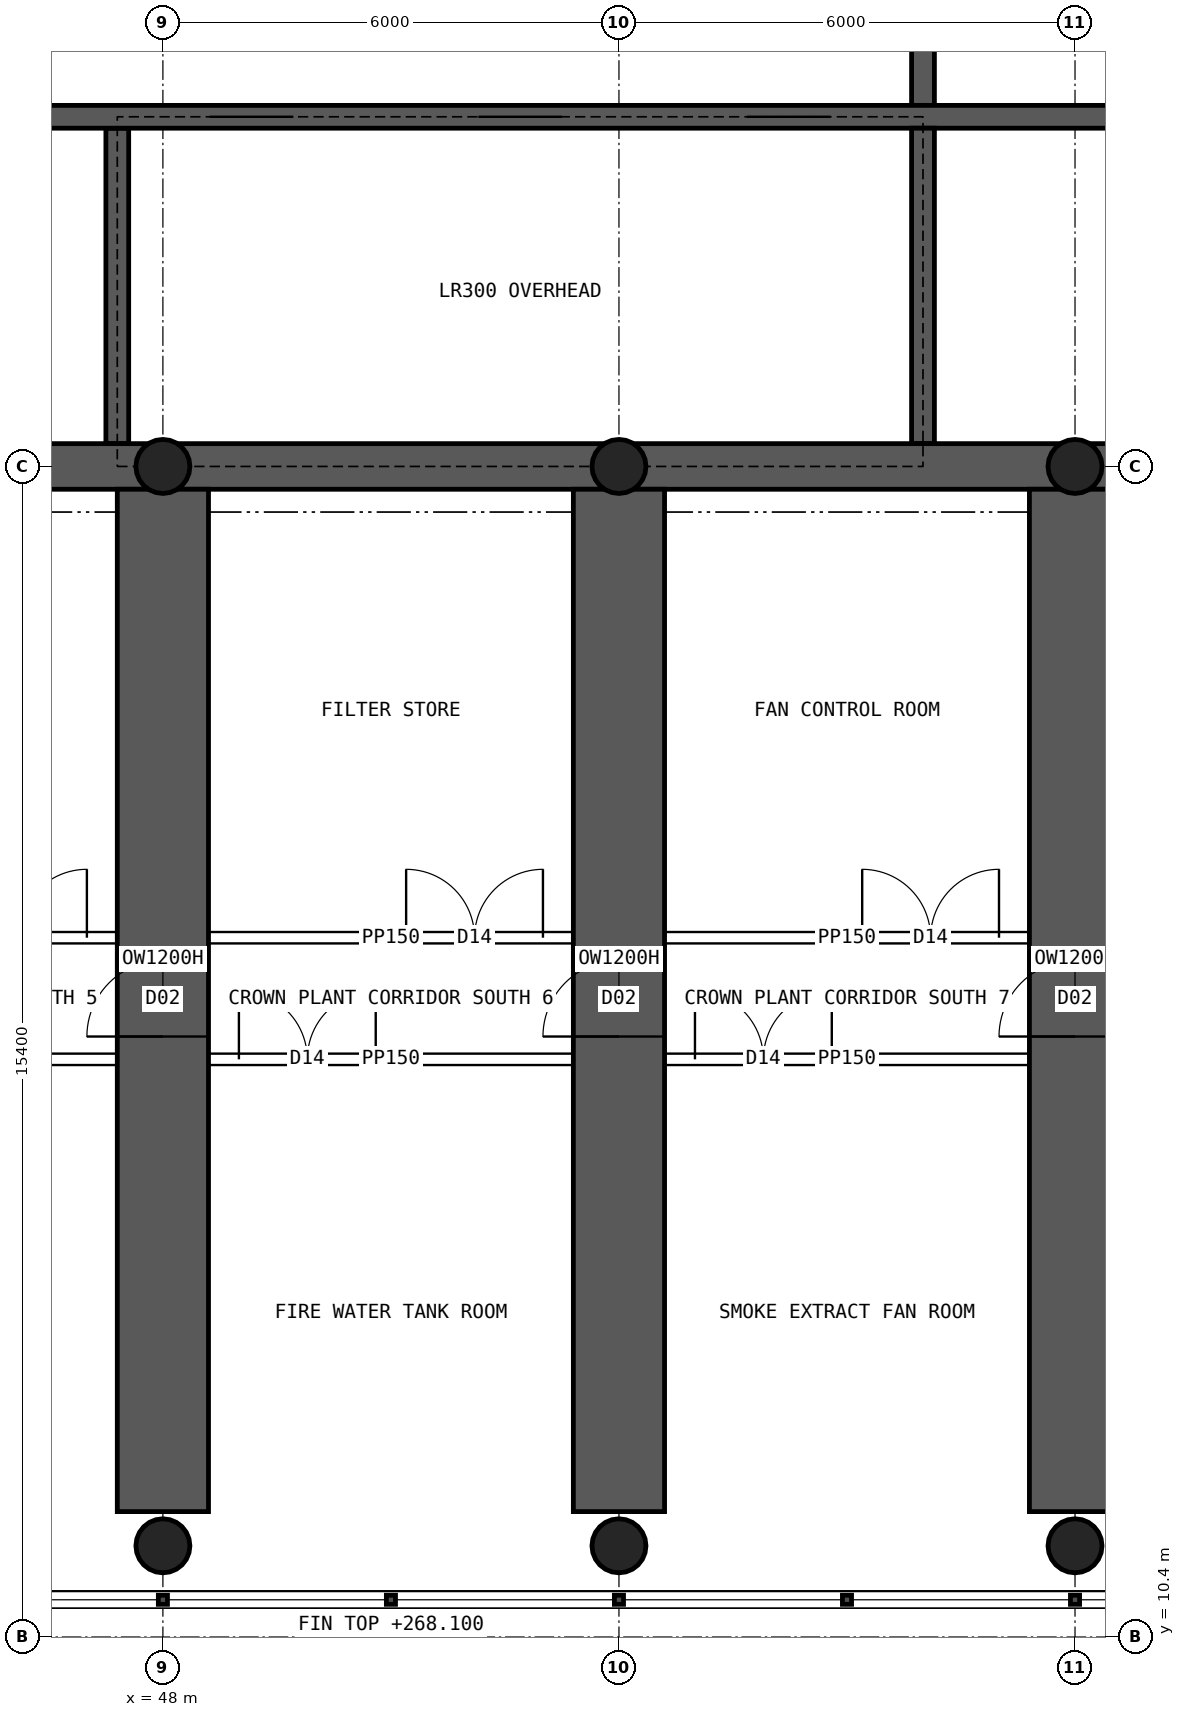
"""IFC4 building model, lengths in metres.
Left out: names, types, materials, properties, quantities, classifications, styles, units other than length and angle.
Written with IfcOpenShell. Run it as: python <this file> out.ifc"""

import sys

from ifc_helpers import new_model, si_unit, direction, frame, frame_2d, origin, origin_2d, place, context, subcontext, project, spatial, rectangle, hollow_circle, extrude, element, fill, save


model = new_model("IFC4")
c1 = context("Model", 3, precision=1e-05, world=origin(), true_north=direction((0.0, 1.0)))
c2 = subcontext(c1, "Body", "Model", "MODEL_VIEW")
j1 = project(units=[si_unit("LENGTHUNIT", "METRE"), si_unit("PLANEANGLEUNIT", "RADIAN")], contexts=[c1])
p1 = place(None, origin())
s1 = spatial("IfcSite", under=j1, at=p1, CompositionType="ELEMENT")
p2 = place(p1, origin())
s2 = spatial("IfcBuilding", under=s1, at=p2, CompositionType="ELEMENT")
p3 = place(p2, frame((0.0, 0.0, 262.3)))
s3 = spatial("IfcBuildingStorey", under=s2, at=p3, CompositionType="ELEMENT", Elevation=262.3)
p4 = place(p3, frame((18.0, 25.8, 0.0), z_axis=(0.0, 0.0, 1.0), x_axis=(1.0, 0.0, 0.0)))
e1 = element("IfcWall", 1, at=p4, inside=s3, PredefinedType="SHEAR", context=c2, shape_type="SweptSolid", body=[
    extrude(rectangle(XDim=48.0, YDim=0.6, at=frame_2d((24.0, 0.0))), origin(), (0.0, 0.0, 1.0), 6.0),
])
p5 = place(p3, frame((18.3, 30.4, 0.0), z_axis=(0.0, 0.0, 1.0), x_axis=(1.0, 0.0, 0.0)))
e2 = element("IfcWall", 2, at=p5, inside=s3, PredefinedType="SHEAR", context=c2, shape_type="SweptSolid", body=[
    extrude(rectangle(XDim=47.4, YDim=0.3, at=frame_2d((23.7, 0.0))), origin(), (0.0, 0.0, 1.0), 6.0),
])
p6 = place(p5, frame((0.4, 0.0, 0.0)))
e3 = element("IfcOpeningElement", 3, at=p6, cuts=e2, PredefinedType="OPENING", context=c2, shape_type="SweptSolid", body=[
    extrude(rectangle(XDim=1.0, YDim=2.1, at=frame_2d((0.5, 1.05))), frame((0.0, 0.16, 0.0), z_axis=(0.0, -1.0, 0.0), x_axis=(1.0, 0.0, 0.0)), (0.0, 0.0, 1.0), 0.32),
])
p7 = place(p5, frame((46.0, 0.0, 0.0)))
e4 = element("IfcOpeningElement", 4, at=p7, cuts=e2, PredefinedType="OPENING", context=c2, shape_type="SweptSolid", body=[
    extrude(rectangle(XDim=1.0, YDim=2.1, at=frame_2d((0.5, 1.05))), frame((0.0, 0.16, 0.0), z_axis=(0.0, -1.0, 0.0), x_axis=(1.0, 0.0, 0.0)), (0.0, 0.0, 1.0), 0.32),
])
p8 = place(p5, frame((19.025, 0.0, 0.0)))
e5 = element("IfcOpeningElement", 5, at=p8, cuts=e2, PredefinedType="OPENING", context=c2, shape_type="SweptSolid", body=[
    extrude(rectangle(XDim=0.9, YDim=2.1, at=frame_2d((0.45, 1.05))), frame((0.0, 0.16, 0.0), z_axis=(0.0, -1.0, 0.0), x_axis=(1.0, 0.0, 0.0)), (0.0, 0.0, 1.0), 0.32),
])
p9 = place(p5, frame((24.525, 0.0, 0.0)))
e6 = element("IfcOpeningElement", 6, at=p9, cuts=e2, PredefinedType="OPENING", context=c2, shape_type="SweptSolid", body=[
    extrude(rectangle(XDim=0.9, YDim=2.1, at=frame_2d((0.45, 1.05))), frame((0.0, 0.16, 0.0), z_axis=(0.0, -1.0, 0.0), x_axis=(1.0, 0.0, 0.0)), (0.0, 0.0, 1.0), 0.32),
])
p10 = place(p5, frame((30.317, 0.0, 0.0)))
e7 = element("IfcOpeningElement", 7, at=p10, cuts=e2, PredefinedType="OPENING", context=c2, shape_type="SweptSolid", body=[
    extrude(rectangle(XDim=1.1, YDim=2.1, at=frame_2d((0.55, 1.05))), frame((0.0, 0.16, 0.0), z_axis=(0.0, -1.0, 0.0), x_axis=(1.0, 0.0, 0.0)), (0.0, 0.0, 1.0), 0.32),
])
p11 = place(p5, frame((33.85, 0.0, 0.0)))
e8 = element("IfcOpeningElement", 8, at=p11, cuts=e2, PredefinedType="OPENING", context=c2, shape_type="SweptSolid", body=[
    extrude(rectangle(XDim=1.1, YDim=2.1, at=frame_2d((0.55, 1.05))), frame((0.0, 0.16, 0.0), z_axis=(0.0, -1.0, 0.0), x_axis=(1.0, 0.0, 0.0)), (0.0, 0.0, 1.0), 0.32),
])
p12 = place(p5, frame((37.383, 0.0, 0.0)))
e9 = element("IfcOpeningElement", 9, at=p12, cuts=e2, PredefinedType="OPENING", context=c2, shape_type="SweptSolid", body=[
    extrude(rectangle(XDim=1.1, YDim=2.1, at=frame_2d((0.55, 1.05))), frame((0.0, 0.16, 0.0), z_axis=(0.0, -1.0, 0.0), x_axis=(1.0, 0.0, 0.0)), (0.0, 0.0, 1.0), 0.32),
])
p13 = place(p3, frame((58.0, 26.1, 0.0), z_axis=(0.0, 0.0, 1.0), x_axis=(0.0, 1.0, 0.0)))
e10 = element("IfcWall", 10, at=p13, inside=s3, PredefinedType="SHEAR", context=c2, shape_type="SweptSolid", body=[
    extrude(rectangle(XDim=4.15, YDim=0.3, at=frame_2d((2.075, 0.0))), origin(), (0.0, 0.0, 1.0), 6.0),
])
p14 = place(p3, frame((58.0, 30.55, 0.0), z_axis=(0.0, 0.0, 1.0), x_axis=(0.0, 1.0, 0.0)))
e11 = element("IfcWall", 11, at=p14, inside=s3, PredefinedType="SHEAR", context=c2, shape_type="SweptSolid", body=[
    extrude(rectangle(XDim=3.9, YDim=0.3, at=frame_2d((1.95, 0.0))), origin(), (0.0, 0.0, 1.0), 6.0),
])
p15 = place(p14, frame((1.4, 0.0, 0.0)))
e12 = element("IfcOpeningElement", 12, at=p15, cuts=e11, PredefinedType="OPENING", context=c2, shape_type="SweptSolid", body=[
    extrude(rectangle(XDim=1.2, YDim=2.1, at=frame_2d((0.6, 1.05))), frame((0.0, 0.16, 0.0), z_axis=(0.0, -1.0, 0.0), x_axis=(1.0, 0.0, 0.0)), (0.0, 0.0, 1.0), 0.32),
])
p16 = place(p3, frame((47.4, 26.1, 0.0), z_axis=(0.0, 0.0, 1.0), x_axis=(0.0, 1.0, 0.0)))
e13 = element("IfcWall", 13, at=p16, inside=s3, PredefinedType="SHEAR", context=c2, shape_type="SweptSolid", body=[
    extrude(rectangle(XDim=4.15, YDim=0.3, at=frame_2d((2.075, 0.0))), origin(), (0.0, 0.0, 1.0), 6.0),
])
p17 = place(p3, frame((48.0, 12.05, 0.0), z_axis=(0.0, 0.0, 1.0), x_axis=(0.0, 1.0, 0.0)))
e14 = element("IfcWall", 14, at=p17, inside=s3, PredefinedType="SHEAR", context=c2, shape_type="SweptSolid", body=[
    extrude(rectangle(XDim=13.45, YDim=1.2, at=frame_2d((6.725, 0.0))), origin(), (0.0, 0.0, 1.0), 4.4),
])
p18 = place(p17, frame((6.25, 0.0, 0.0)))
e15 = element("IfcOpeningElement", 15, at=p18, cuts=e14, PredefinedType="OPENING", context=c2, shape_type="SweptSolid", body=[
    extrude(rectangle(XDim=1.0, YDim=2.1, at=frame_2d((0.5, 1.05))), frame((0.0, 0.61, 0.0), z_axis=(0.0, -1.0, 0.0), x_axis=(1.0, 0.0, 0.0)), (0.0, 0.0, 1.0), 1.22),
])
p19 = place(p3, frame((54.0, 12.05, 0.0), z_axis=(0.0, 0.0, 1.0), x_axis=(0.0, 1.0, 0.0)))
e16 = element("IfcWall", 16, at=p19, inside=s3, PredefinedType="SHEAR", context=c2, shape_type="SweptSolid", body=[
    extrude(rectangle(XDim=13.45, YDim=1.2, at=frame_2d((6.725, 0.0))), origin(), (0.0, 0.0, 1.0), 4.4),
])
p20 = place(p19, frame((6.25, 0.0, 0.0)))
e17 = element("IfcOpeningElement", 17, at=p20, cuts=e16, PredefinedType="OPENING", context=c2, shape_type="SweptSolid", body=[
    extrude(rectangle(XDim=1.0, YDim=2.1, at=frame_2d((0.5, 1.05))), frame((0.0, 0.61, 0.0), z_axis=(0.0, -1.0, 0.0), x_axis=(1.0, 0.0, 0.0)), (0.0, 0.0, 1.0), 1.22),
])
p21 = place(p3, frame((60.0, 12.05, 0.0), z_axis=(0.0, 0.0, 1.0), x_axis=(0.0, 1.0, 0.0)))
e18 = element("IfcWall", 18, at=p21, inside=s3, PredefinedType="SHEAR", context=c2, shape_type="SweptSolid", body=[
    extrude(rectangle(XDim=13.45, YDim=1.2, at=frame_2d((6.725, 0.0))), origin(), (0.0, 0.0, 1.0), 4.4),
])
p22 = place(p21, frame((6.25, 0.0, 0.0)))
e19 = element("IfcOpeningElement", 19, at=p22, cuts=e18, PredefinedType="OPENING", context=c2, shape_type="SweptSolid", body=[
    extrude(rectangle(XDim=1.0, YDim=2.1, at=frame_2d((0.5, 1.05))), frame((0.0, 0.61, 0.0), z_axis=(0.0, -1.0, 0.0), x_axis=(1.0, 0.0, 0.0)), (0.0, 0.0, 1.0), 1.22),
])
p23 = place(p3, frame((48.0, 11.6, 0.0), z_axis=(0.0, 0.0, 1.0), x_axis=(1.0, 0.0, 0.0)))
e20 = element("IfcColumn", 20, at=p23, inside=s3, PredefinedType="COLUMN", context=c2, shape_type="SweptSolid", body=[
    extrude(hollow_circle(Radius=0.355, WallThickness=0.025, at=origin_2d()), origin(), (0.0, 0.0, 1.0), 4.885),
])
p24 = place(p3, frame((48.0, 25.8, 0.0), z_axis=(0.0, 0.0, 1.0), x_axis=(1.0, 0.0, 0.0)))
e21 = element("IfcColumn", 21, at=p24, inside=s3, PredefinedType="COLUMN", context=c2, shape_type="SweptSolid", body=[
    extrude(hollow_circle(Radius=0.355, WallThickness=0.025, at=origin_2d()), origin(), (0.0, 0.0, 1.0), 8.426),
])
p25 = place(p3, frame((54.0, 11.6, 0.0), z_axis=(0.0, 0.0, 1.0), x_axis=(1.0, 0.0, 0.0)))
e22 = element("IfcColumn", 22, at=p25, inside=s3, PredefinedType="COLUMN", context=c2, shape_type="SweptSolid", body=[
    extrude(hollow_circle(Radius=0.355, WallThickness=0.025, at=origin_2d()), origin(), (0.0, 0.0, 1.0), 4.885),
])
p26 = place(p3, frame((54.0, 25.8, 0.0), z_axis=(0.0, 0.0, 1.0), x_axis=(1.0, 0.0, 0.0)))
e23 = element("IfcColumn", 23, at=p26, inside=s3, PredefinedType="COLUMN", context=c2, shape_type="SweptSolid", body=[
    extrude(hollow_circle(Radius=0.355, WallThickness=0.025, at=origin_2d()), origin(), (0.0, 0.0, 1.0), 8.426),
])
p27 = place(p3, frame((60.0, 11.6, 0.0), z_axis=(0.0, 0.0, 1.0), x_axis=(1.0, 0.0, 0.0)))
e24 = element("IfcColumn", 24, at=p27, inside=s3, PredefinedType="COLUMN", context=c2, shape_type="SweptSolid", body=[
    extrude(hollow_circle(Radius=0.355, WallThickness=0.025, at=origin_2d()), origin(), (0.0, 0.0, 1.0), 4.885),
])
p28 = place(p3, frame((60.0, 25.8, 0.0), z_axis=(0.0, 0.0, 1.0), x_axis=(1.0, 0.0, 0.0)))
e25 = element("IfcColumn", 25, at=p28, inside=s3, PredefinedType="COLUMN", context=c2, shape_type="SweptSolid", body=[
    extrude(hollow_circle(Radius=0.355, WallThickness=0.025, at=origin_2d()), origin(), (0.0, 0.0, 1.0), 8.426),
])
p29 = place(p3, frame((42.6, 18.0, 0.0), z_axis=(0.0, 0.0, 1.0), x_axis=(1.0, 0.0, 0.0)))
e26 = element("IfcWall", 26, at=p29, inside=s3, PredefinedType="PARTITIONING", context=c2, shape_type="SweptSolid", body=[
    extrude(rectangle(XDim=4.8, YDim=0.15, at=frame_2d((2.4, 0.0))), origin(), (0.0, 0.0, 1.0), 6.0),
])
p30 = place(p29, frame((0.4, 0.0, 0.0)))
e27 = element("IfcOpeningElement", 27, at=p30, cuts=e26, PredefinedType="OPENING", context=c2, shape_type="SweptSolid", body=[
    extrude(rectangle(XDim=1.8, YDim=2.4, at=frame_2d((0.9, 1.2))), frame((0.0, 0.085, 0.0), z_axis=(0.0, -1.0, 0.0), x_axis=(1.0, 0.0, 0.0)), (0.0, 0.0, 1.0), 0.17),
])
p31 = place(p3, frame((42.6, 19.6, 0.0), z_axis=(0.0, 0.0, 1.0), x_axis=(1.0, 0.0, 0.0)))
e28 = element("IfcWall", 28, at=p31, inside=s3, PredefinedType="PARTITIONING", context=c2, shape_type="SweptSolid", body=[
    extrude(rectangle(XDim=4.8, YDim=0.15, at=frame_2d((2.4, 0.0))), origin(), (0.0, 0.0, 1.0), 6.0),
])
p32 = place(p31, frame((2.6, 0.0, 0.0)))
e29 = element("IfcOpeningElement", 29, at=p32, cuts=e28, PredefinedType="OPENING", context=c2, shape_type="SweptSolid", body=[
    extrude(rectangle(XDim=1.8, YDim=2.4, at=frame_2d((0.9, 1.2))), frame((0.0, 0.085, 0.0), z_axis=(0.0, -1.0, 0.0), x_axis=(1.0, 0.0, 0.0)), (0.0, 0.0, 1.0), 0.17),
])
p33 = place(p3, frame((48.6, 18.0, 0.0), z_axis=(0.0, 0.0, 1.0), x_axis=(1.0, 0.0, 0.0)))
e30 = element("IfcWall", 30, at=p33, inside=s3, PredefinedType="PARTITIONING", context=c2, shape_type="SweptSolid", body=[
    extrude(rectangle(XDim=4.8, YDim=0.15, at=frame_2d((2.4, 0.0))), origin(), (0.0, 0.0, 1.0), 6.0),
])
p34 = place(p33, frame((0.4, 0.0, 0.0)))
e31 = element("IfcOpeningElement", 31, at=p34, cuts=e30, PredefinedType="OPENING", context=c2, shape_type="SweptSolid", body=[
    extrude(rectangle(XDim=1.8, YDim=2.4, at=frame_2d((0.9, 1.2))), frame((0.0, 0.085, 0.0), z_axis=(0.0, -1.0, 0.0), x_axis=(1.0, 0.0, 0.0)), (0.0, 0.0, 1.0), 0.17),
])
p35 = place(p3, frame((48.6, 19.6, 0.0), z_axis=(0.0, 0.0, 1.0), x_axis=(1.0, 0.0, 0.0)))
e32 = element("IfcWall", 32, at=p35, inside=s3, PredefinedType="PARTITIONING", context=c2, shape_type="SweptSolid", body=[
    extrude(rectangle(XDim=4.8, YDim=0.15, at=frame_2d((2.4, 0.0))), origin(), (0.0, 0.0, 1.0), 6.0),
])
p36 = place(p35, frame((2.6, 0.0, 0.0)))
e33 = element("IfcOpeningElement", 33, at=p36, cuts=e32, PredefinedType="OPENING", context=c2, shape_type="SweptSolid", body=[
    extrude(rectangle(XDim=1.8, YDim=2.4, at=frame_2d((0.9, 1.2))), frame((0.0, 0.085, 0.0), z_axis=(0.0, -1.0, 0.0), x_axis=(1.0, 0.0, 0.0)), (0.0, 0.0, 1.0), 0.17),
])
p37 = place(p3, frame((54.6, 18.0, 0.0), z_axis=(0.0, 0.0, 1.0), x_axis=(1.0, 0.0, 0.0)))
e34 = element("IfcWall", 34, at=p37, inside=s3, PredefinedType="PARTITIONING", context=c2, shape_type="SweptSolid", body=[
    extrude(rectangle(XDim=4.8, YDim=0.15, at=frame_2d((2.4, 0.0))), origin(), (0.0, 0.0, 1.0), 6.0),
])
p38 = place(p37, frame((0.4, 0.0, 0.0)))
e35 = element("IfcOpeningElement", 35, at=p38, cuts=e34, PredefinedType="OPENING", context=c2, shape_type="SweptSolid", body=[
    extrude(rectangle(XDim=1.8, YDim=2.4, at=frame_2d((0.9, 1.2))), frame((0.0, 0.085, 0.0), z_axis=(0.0, -1.0, 0.0), x_axis=(1.0, 0.0, 0.0)), (0.0, 0.0, 1.0), 0.17),
])
p39 = place(p3, frame((54.6, 19.6, 0.0), z_axis=(0.0, 0.0, 1.0), x_axis=(1.0, 0.0, 0.0)))
e36 = element("IfcWall", 36, at=p39, inside=s3, PredefinedType="PARTITIONING", context=c2, shape_type="SweptSolid", body=[
    extrude(rectangle(XDim=4.8, YDim=0.15, at=frame_2d((2.4, 0.0))), origin(), (0.0, 0.0, 1.0), 6.0),
])
p40 = place(p39, frame((2.6, 0.0, 0.0)))
e37 = element("IfcOpeningElement", 37, at=p40, cuts=e36, PredefinedType="OPENING", context=c2, shape_type="SweptSolid", body=[
    extrude(rectangle(XDim=1.8, YDim=2.4, at=frame_2d((0.9, 1.2))), frame((0.0, 0.085, 0.0), z_axis=(0.0, -1.0, 0.0), x_axis=(1.0, 0.0, 0.0)), (0.0, 0.0, 1.0), 0.17),
])
p41 = place(p10, origin())
e38 = element("IfcDoor", 38, at=p41, inside=s3, OperationType="DOUBLE_DOOR_SLIDING", PredefinedType="DOOR", context=c2, shape_type="SweptSolid", body=[
    extrude(rectangle(XDim=1.1, YDim=2.1, at=frame_2d((0.55, 1.05))), frame((0.0, 0.025, 0.0), z_axis=(0.0, -1.0, 0.0), x_axis=(1.0, 0.0, 0.0)), (0.0, 0.0, 1.0), 0.05),
])
fill(e7, e38)
p42 = place(p11, origin())
e39 = element("IfcDoor", 39, at=p42, inside=s3, OperationType="DOUBLE_DOOR_SLIDING", PredefinedType="DOOR", context=c2, shape_type="SweptSolid", body=[
    extrude(rectangle(XDim=1.1, YDim=2.1, at=frame_2d((0.55, 1.05))), frame((0.0, 0.025, 0.0), z_axis=(0.0, -1.0, 0.0), x_axis=(1.0, 0.0, 0.0)), (0.0, 0.0, 1.0), 0.05),
])
fill(e8, e39)
p43 = place(p12, origin())
e40 = element("IfcDoor", 40, at=p43, inside=s3, OperationType="DOUBLE_DOOR_SLIDING", PredefinedType="DOOR", context=c2, shape_type="SweptSolid", body=[
    extrude(rectangle(XDim=1.1, YDim=2.1, at=frame_2d((0.55, 1.05))), frame((0.0, 0.025, 0.0), z_axis=(0.0, -1.0, 0.0), x_axis=(1.0, 0.0, 0.0)), (0.0, 0.0, 1.0), 0.05),
])
fill(e9, e40)
p44 = place(p18, origin())
e41 = element("IfcDoor", 41, at=p44, inside=s3, OperationType="SINGLE_SWING_LEFT", PredefinedType="DOOR", context=c2, shape_type="SweptSolid", body=[
    extrude(rectangle(XDim=1.0, YDim=2.1, at=frame_2d((0.5, 1.05))), frame((0.0, 0.025, 0.0), z_axis=(0.0, -1.0, 0.0), x_axis=(1.0, 0.0, 0.0)), (0.0, 0.0, 1.0), 0.05),
])
fill(e15, e41)
p45 = place(p20, origin())
e42 = element("IfcDoor", 42, at=p45, inside=s3, OperationType="SINGLE_SWING_LEFT", PredefinedType="DOOR", context=c2, shape_type="SweptSolid", body=[
    extrude(rectangle(XDim=1.0, YDim=2.1, at=frame_2d((0.5, 1.05))), frame((0.0, 0.025, 0.0), z_axis=(0.0, -1.0, 0.0), x_axis=(1.0, 0.0, 0.0)), (0.0, 0.0, 1.0), 0.05),
])
fill(e17, e42)
p46 = place(p22, origin())
e43 = element("IfcDoor", 43, at=p46, inside=s3, OperationType="SINGLE_SWING_LEFT", PredefinedType="DOOR", context=c2, shape_type="SweptSolid", body=[
    extrude(rectangle(XDim=1.0, YDim=2.1, at=frame_2d((0.5, 1.05))), frame((0.0, 0.025, 0.0), z_axis=(0.0, -1.0, 0.0), x_axis=(1.0, 0.0, 0.0)), (0.0, 0.0, 1.0), 0.05),
])
fill(e19, e43)
p47 = place(p32, origin())
e44 = element("IfcDoor", 44, at=p47, inside=s3, OperationType="DOUBLE_DOOR_SINGLE_SWING", PredefinedType="DOOR", context=c2, shape_type="SweptSolid", body=[
    extrude(rectangle(XDim=1.8, YDim=2.4, at=frame_2d((0.9, 1.2))), frame((0.0, 0.025, 0.0), z_axis=(0.0, -1.0, 0.0), x_axis=(1.0, 0.0, 0.0)), (0.0, 0.0, 1.0), 0.05),
])
fill(e29, e44)
p48 = place(p34, origin())
e45 = element("IfcDoor", 45, at=p48, inside=s3, OperationType="DOUBLE_DOOR_SINGLE_SWING", PredefinedType="DOOR", context=c2, shape_type="SweptSolid", body=[
    extrude(rectangle(XDim=1.8, YDim=2.4, at=frame_2d((0.9, 1.2))), frame((0.0, 0.025, 0.0), z_axis=(0.0, -1.0, 0.0), x_axis=(1.0, 0.0, 0.0)), (0.0, 0.0, 1.0), 0.05),
])
fill(e31, e45)
p49 = place(p36, origin())
e46 = element("IfcDoor", 46, at=p49, inside=s3, OperationType="DOUBLE_DOOR_SINGLE_SWING", PredefinedType="DOOR", context=c2, shape_type="SweptSolid", body=[
    extrude(rectangle(XDim=1.8, YDim=2.4, at=frame_2d((0.9, 1.2))), frame((0.0, 0.025, 0.0), z_axis=(0.0, -1.0, 0.0), x_axis=(1.0, 0.0, 0.0)), (0.0, 0.0, 1.0), 0.05),
])
fill(e33, e46)
p50 = place(p38, origin())
e47 = element("IfcDoor", 47, at=p50, inside=s3, OperationType="DOUBLE_DOOR_SINGLE_SWING", PredefinedType="DOOR", context=c2, shape_type="SweptSolid", body=[
    extrude(rectangle(XDim=1.8, YDim=2.4, at=frame_2d((0.9, 1.2))), frame((0.0, 0.025, 0.0), z_axis=(0.0, -1.0, 0.0), x_axis=(1.0, 0.0, 0.0)), (0.0, 0.0, 1.0), 0.05),
])
fill(e35, e47)
p51 = place(p40, origin())
e48 = element("IfcDoor", 48, at=p51, inside=s3, OperationType="DOUBLE_DOOR_SINGLE_SWING", PredefinedType="DOOR", context=c2, shape_type="SweptSolid", body=[
    extrude(rectangle(XDim=1.8, YDim=2.4, at=frame_2d((0.9, 1.2))), frame((0.0, 0.025, 0.0), z_axis=(0.0, -1.0, 0.0), x_axis=(1.0, 0.0, 0.0)), (0.0, 0.0, 1.0), 0.05),
])
fill(e37, e48)
save(model, sys.argv[1])
